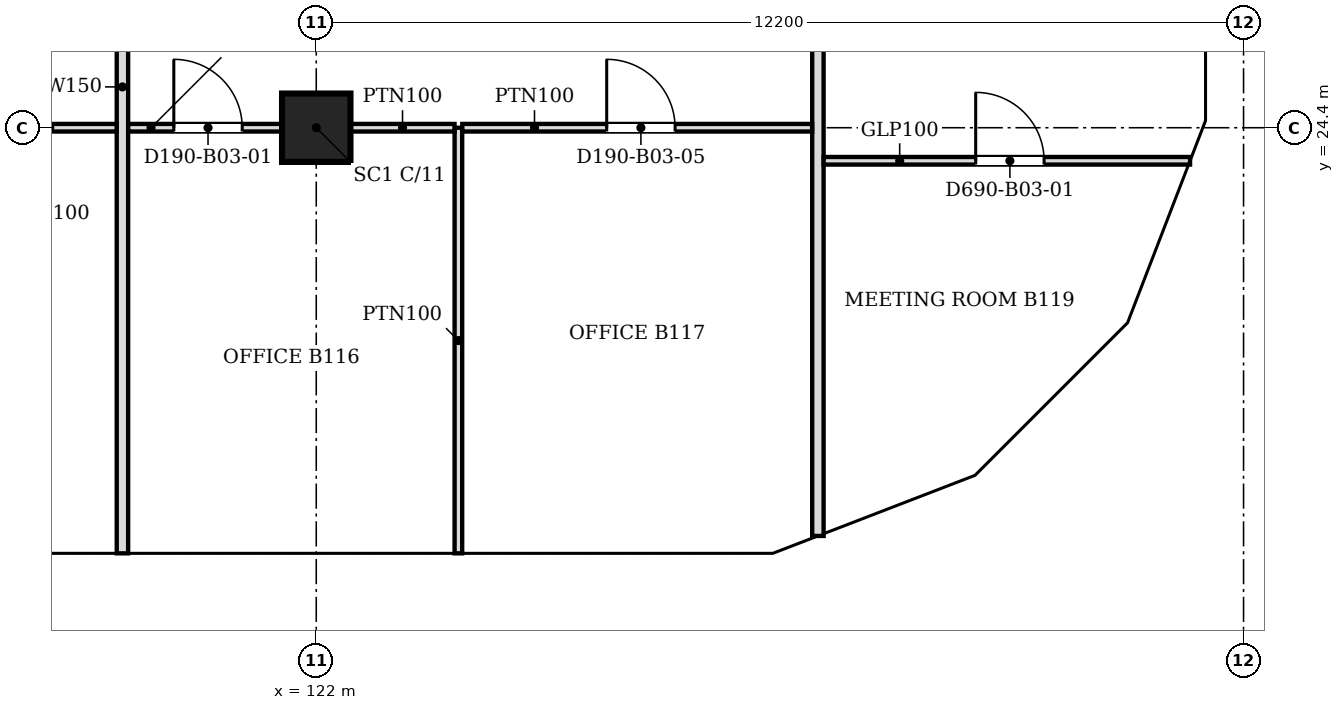
"""IFC4 building model, lengths in metres.
Left out: names, types, materials, properties, quantities, classifications, styles, units other than length and angle.
Written with IfcOpenShell. Run it as: python <this file> out.ifc"""

import sys

from ifc_helpers import new_model, si_unit, direction, frame, frame_2d, origin, origin_2d, place, context, subcontext, project, spatial, polyline, rectangle, outline, extrude, faceted_brep, source, transform, mapped, element, fill, save


model = new_model("IFC4")
c1 = context("Model", 3, precision=1e-05, world=origin(), true_north=direction((0.0, 1.0)))
c2 = subcontext(c1, "Body", "Model", "MODEL_VIEW")
j1 = project(units=[si_unit("LENGTHUNIT", "METRE"), si_unit("PLANEANGLEUNIT", "RADIAN")], contexts=[c1])
p1 = place(None, origin())
s1 = spatial("IfcSite", under=j1, at=p1, CompositionType="ELEMENT")
p2 = place(p1, origin())
s2 = spatial("IfcBuilding", under=s1, at=p2, CompositionType="ELEMENT")
p3 = place(p2, frame((0.0, 0.0, 33.4)))
s3 = spatial("IfcBuildingStorey", under=s2, at=p3, CompositionType="ELEMENT", Elevation=33.4)
p4 = place(p3, frame((122.0, 24.4, 0.0), z_axis=(0.0, 0.0, 1.0), x_axis=(1.0, 0.0, 0.0)))
e1 = element("IfcColumn", 1, at=p4, inside=s3, PredefinedType="COLUMN", context=c2, shape_type="SweptSolid", body=[
    extrude(rectangle(XDim=0.9, YDim=0.9, at=origin_2d()), origin(), (0.0, 0.0, 1.0), 3.6),
])
m1 = source(origin(), c2, "Body", "Brep", [
    faceted_brep([(3.05, -0.25, 0.0), (6.1, -0.25, 3.8), (6.1, -0.25, 3.8), (3.05, -0.25, 7.6), (0.0, -0.25, 3.8), (0.0, 0.25, 3.8), (3.05, 0.25, 7.6), (6.1, 0.25, 3.8), (6.1, 0.25, 3.8), (3.05, 0.25, 0.0)], [[[0, 1, 2, 3, 4]], [[5, 6, 7, 8, 9]], [[9, 8, 1, 0]], [[7, 6, 3, 2]], [[6, 5, 4, 3]], [[5, 9, 0, 4]], [[1, 8, 7, 2]]]),
])
p5 = place(p3, frame((112.85, 18.55, -3.8), z_axis=(0.0, 0.0, 1.0), x_axis=(1.0, 0.0, 0.0)))
e2 = element("IfcWall", 2, at=p5, inside=s3, PredefinedType="SOLIDWALL", context=c2, shape_type="MappedRepresentation", body=[
    mapped(m1, transform((0.0, 0.0, 0.0), scale=1.0)),
])
m2 = source(origin(), c2, "Body", "SweptSolid", [
    extrude(outline(polyline([(3.05, 0.399), (5.78, 3.8), (3.05, 7.2), (0.321, 3.8), (3.05, 0.399)])), frame((0.0, 0.26, 0.0), z_axis=(0.0, -1.0, 0.0), x_axis=(1.0, 0.0, 0.0)), (0.0, 0.0, 1.0), 0.52),
])
p6 = place(p5, origin())
e3 = element("IfcOpeningElement", 3, at=p6, cuts=e2, PredefinedType="OPENING", context=c2, shape_type="MappedRepresentation", body=[
    mapped(m2, transform((0.0, 0.0, 0.0), scale=1.0)),
])
m3 = source(origin(), c2, "Body", "SweptSolid", [
    extrude(outline(polyline([(3.05, 0.0), (6.1, 3.8), (3.05, 7.6), (0.0, 3.8), (3.05, 0.0)])), frame((0.0, 0.25, 0.0), z_axis=(0.0, -1.0, 0.0), x_axis=(1.0, 0.0, 0.0)), (0.0, 0.0, 1.0), 0.5),
])
p7 = place(p3, frame((118.95, 18.55, -3.8), z_axis=(0.0, 0.0, 1.0), x_axis=(1.0, 0.0, 0.0)))
e4 = element("IfcWall", 4, at=p7, inside=s3, PredefinedType="SOLIDWALL", context=c2, shape_type="MappedRepresentation", body=[
    mapped(m3, transform((0.0, 0.0, 0.0), scale=1.0)),
])
p8 = place(p7, origin())
e5 = element("IfcOpeningElement", 5, at=p8, cuts=e4, PredefinedType="OPENING", context=c2, shape_type="MappedRepresentation", body=[
    mapped(m2, transform((0.0, 0.0, 0.0), scale=1.0)),
])
m4 = source(origin(), c2, "Body", "Brep", [
    faceted_brep([(3.003, -0.25, 0.0), (3.05, -0.25, 0.06), (3.05, -0.25, 7.54), (3.003, -0.25, 7.6), (0.0, -0.25, 3.8), (0.0, 0.25, 3.8), (2.957, 0.25, 7.541), (2.957, 0.25, 0.059), (3.003, 0.0, 0.0), (3.003, 0.0, 7.6)], [[[0, 1, 2, 3, 4]], [[5, 6, 7]], [[1, 0, 8]], [[9, 3, 2]], [[6, 5, 4, 3, 9]], [[5, 7, 8, 0, 4]], [[1, 8, 7, 6, 9, 2]]]),
])
p9 = place(p3, frame((125.05, 18.55, -3.8), z_axis=(0.0, 0.0, 1.0), x_axis=(1.0, 0.0, 0.0)))
e6 = element("IfcWall", 6, at=p9, inside=s3, PredefinedType="SOLIDWALL", context=c2, shape_type="MappedRepresentation", body=[
    mapped(m4, transform((0.0, 0.0, 0.0), scale=1.0)),
])
m5 = source(origin(), c2, "Body", "SweptSolid", [
    extrude(outline(polyline([(2.803, 6.944), (0.319, 3.8), (2.803, 0.656), (2.803, 6.944)])), frame((0.0, 0.26, 0.0), z_axis=(0.0, -1.0, 0.0), x_axis=(1.0, 0.0, 0.0)), (0.0, 0.0, 1.0), 0.52),
])
p10 = place(p9, origin())
e7 = element("IfcOpeningElement", 7, at=p10, cuts=e6, PredefinedType="OPENING", context=c2, shape_type="MappedRepresentation", body=[
    mapped(m5, transform((0.0, 0.0, 0.0), scale=1.0)),
])
m6 = source(origin(), c2, "Body", "Brep", [
    faceted_brep([(0.047, -0.25, 0.0), (2.997, -0.25, 3.8), (0.047, -0.25, 7.6), (0.0, -0.25, 7.541), (0.0, -0.25, 0.059), (0.093, 0.25, 7.54), (2.944, 0.25, 3.868), (2.944, 0.25, 3.732), (0.093, 0.25, 0.06), (2.997, 0.0, 3.8), (0.047, 0.0, 0.0), (0.047, 0.0, 7.6)], [[[0, 1, 2, 3, 4]], [[5, 6, 7, 8]], [[8, 7, 9, 1, 0, 10]], [[6, 5, 11, 2, 1, 9]], [[3, 2, 11]], [[10, 0, 4]], [[8, 10, 4, 3, 11, 5]], [[9, 7, 6]]]),
])
p11 = place(p3, frame((128.01, 18.533, -3.8), z_axis=(0.0, 0.0, 1.0), x_axis=(0.932990326376, 0.359901446078, 0.0)))
e8 = element("IfcWall", 8, at=p11, inside=s3, PredefinedType="SOLIDWALL", context=c2, shape_type="MappedRepresentation", body=[
    mapped(m6, transform((0.0, 0.0, 0.0), scale=1.0)),
])
m7 = source(origin(), c2, "Body", "SweptSolid", [
    extrude(outline(polyline([(0.247, 0.665), (2.681, 3.8), (0.247, 6.935), (0.247, 0.665)])), frame((0.0, 0.26, 0.0), z_axis=(0.0, -1.0, 0.0), x_axis=(1.0, 0.0, 0.0)), (0.0, 0.0, 1.0), 0.52),
])
p12 = place(p11, origin())
e9 = element("IfcOpeningElement", 9, at=p12, cuts=e8, PredefinedType="OPENING", context=c2, shape_type="MappedRepresentation", body=[
    mapped(m7, transform((0.0, 0.0, 0.0), scale=1.0)),
])
m8 = source(origin(), c2, "Body", "Brep", [
    faceted_brep([(2.944, -0.25, 0.0), (2.997, -0.25, 0.068), (2.997, -0.25, 7.532), (2.944, -0.25, 7.6), (0.0, -0.25, 3.8), (0.053, 0.25, 3.868), (2.891, 0.25, 7.532), (2.891, 0.25, 0.068), (0.053, 0.25, 3.731), (2.944, 0.0, 0.0), (2.944, 0.0, 7.6), (0.0, 0.0, 3.8)], [[[0, 1, 2, 3, 4]], [[5, 6, 7, 8]], [[1, 0, 9]], [[10, 3, 2]], [[6, 5, 11, 4, 3, 10]], [[8, 7, 9, 0, 4, 11]], [[8, 11, 5]], [[1, 9, 7, 6, 10, 2]]]),
])
p13 = place(p3, frame((130.806, 19.612, -3.8), z_axis=(0.0, 0.0, 1.0), x_axis=(0.707106781187, 0.707106781187, 0.0)))
e10 = element("IfcWall", 10, at=p13, inside=s3, PredefinedType="SOLIDWALL", context=c2, shape_type="MappedRepresentation", body=[
    mapped(m8, transform((0.0, 0.0, 0.0), scale=1.0)),
])
m9 = source(origin(), c2, "Body", "SweptSolid", [
    extrude(outline(polyline([(2.744, 6.934), (0.316, 3.8), (2.744, 0.666), (2.744, 6.934)])), frame((0.0, 0.26, 0.0), z_axis=(0.0, -1.0, 0.0), x_axis=(1.0, 0.0, 0.0)), (0.0, 0.0, 1.0), 0.52),
])
p14 = place(p13, origin())
e11 = element("IfcOpeningElement", 11, at=p14, cuts=e10, PredefinedType="OPENING", context=c2, shape_type="MappedRepresentation", body=[
    mapped(m9, transform((0.0, 0.0, 0.0), scale=1.0)),
])
m10 = source(origin(), c2, "Body", "Brep", [
    faceted_brep([(0.053, -0.25, 0.0), (3.003, -0.25, 3.8), (0.053, -0.25, 7.6), (0.0, -0.25, 7.531), (0.0, -0.25, 0.068), (0.106, 0.25, 7.532), (2.957, 0.25, 3.86), (2.957, 0.25, 3.74), (0.106, 0.25, 0.068), (3.003, 0.0, 3.8), (0.053, 0.0, 0.0), (0.053, 0.0, 7.6)], [[[0, 1, 2, 3, 4]], [[5, 6, 7, 8]], [[8, 7, 9, 1, 0, 10]], [[6, 5, 11, 2, 1, 9]], [[3, 2, 11]], [[10, 0, 4]], [[8, 10, 4, 3, 11, 5]], [[9, 7, 6]]]),
])
p15 = place(p3, frame((132.869, 21.644, -3.8), z_axis=(0.0, 0.0, 1.0), x_axis=(0.359855894603, 0.933007896601, 0.0)))
e12 = element("IfcWall", 12, at=p15, inside=s3, PredefinedType="SOLIDWALL", context=c2, shape_type="MappedRepresentation", body=[
    mapped(m10, transform((0.0, 0.0, 0.0), scale=1.0)),
])
m11 = source(origin(), c2, "Body", "SweptSolid", [
    extrude(outline(polyline([(0.253, 0.665), (2.687, 3.8), (0.253, 6.935), (0.253, 0.665)])), frame((0.0, 0.26, 0.0), z_axis=(0.0, -1.0, 0.0), x_axis=(1.0, 0.0, 0.0)), (0.0, 0.0, 1.0), 0.52),
])
p16 = place(p15, origin())
e13 = element("IfcOpeningElement", 13, at=p16, cuts=e12, PredefinedType="OPENING", context=c2, shape_type="MappedRepresentation", body=[
    mapped(m11, transform((0.0, 0.0, 0.0), scale=1.0)),
])
m12 = source(origin(), c2, "Body", "Brep", [
    faceted_brep([(3.003, -0.25, 0.0), (6.053, -0.25, 3.8), (3.003, -0.25, 7.6), (0.0, -0.25, 3.8), (0.047, 0.25, 3.859), (3.003, 0.25, 7.6), (6.053, 0.25, 3.8), (3.003, 0.25, 0.0), (0.047, 0.25, 3.741), (0.0, 0.0, 3.8)], [[[0, 1, 2, 3]], [[4, 5, 6, 7, 8]], [[7, 6, 1, 0]], [[6, 5, 2, 1]], [[5, 4, 9, 3, 2]], [[8, 7, 0, 3, 9]], [[8, 9, 4]]]),
])
p17 = place(p3, frame((133.95, 24.447, -3.8), z_axis=(0.0, 0.0, 1.0), x_axis=(0.0, 1.0, 0.0)))
e14 = element("IfcWall", 14, at=p17, inside=s3, PredefinedType="SOLIDWALL", context=c2, shape_type="MappedRepresentation", body=[
    mapped(m12, transform((0.0, 0.0, 0.0), scale=1.0)),
])
m13 = source(origin(), c2, "Body", "SweptSolid", [
    extrude(outline(polyline([(3.005, 0.401), (5.733, 3.8), (3.005, 7.199), (0.319, 3.8), (3.005, 0.401)])), frame((0.0, 0.26, 0.0), z_axis=(0.0, -1.0, 0.0), x_axis=(1.0, 0.0, 0.0)), (0.0, 0.0, 1.0), 0.52),
])
p18 = place(p17, origin())
e15 = element("IfcOpeningElement", 15, at=p18, cuts=e14, PredefinedType="OPENING", context=c2, shape_type="MappedRepresentation", body=[
    mapped(m13, transform((0.0, 0.0, 0.0), scale=1.0)),
])
p19 = place(p2, frame((0.0, 0.0, 37.2)))
s4 = spatial("IfcBuildingStorey", under=s2, at=p19, CompositionType="ELEMENT", Elevation=37.2)
m14 = source(origin(), c2, "Body", "SweptSolid", [
    extrude(outline(polyline([(3.05, 0.0), (6.1, 3.8), (3.05, 7.6), (0.0, 3.8), (3.05, 0.0)])), frame((0.0, 0.25, 0.0), z_axis=(0.0, -1.0, 0.0), x_axis=(1.0, 0.0, 0.0)), (0.0, 0.0, 1.0), 0.5),
])
p20 = place(p19, frame((115.9, 18.55, -3.8), z_axis=(0.0, 0.0, 1.0), x_axis=(1.0, 0.0, 0.0)))
e16 = element("IfcWall", 16, at=p20, inside=s4, PredefinedType="SOLIDWALL", context=c2, shape_type="MappedRepresentation", body=[
    mapped(m14, transform((0.0, 0.0, 0.0), scale=1.0)),
])
m15 = source(origin(), c2, "Body", "SweptSolid", [
    extrude(outline(polyline([(3.05, 0.399), (5.78, 3.8), (3.05, 7.201), (0.321, 3.8), (3.05, 0.399)])), frame((0.0, 0.26, 0.0), z_axis=(0.0, -1.0, 0.0), x_axis=(1.0, 0.0, 0.0)), (0.0, 0.0, 1.0), 0.52),
])
p21 = place(p20, origin())
e17 = element("IfcOpeningElement", 17, at=p21, cuts=e16, PredefinedType="OPENING", context=c2, shape_type="MappedRepresentation", body=[
    mapped(m15, transform((0.0, 0.0, 0.0), scale=1.0)),
])
m16 = source(origin(), c2, "Body", "Brep", [
    faceted_brep([(3.05, -0.25, 0.0), (6.053, -0.25, 3.8), (3.05, -0.25, 7.6), (0.0, -0.25, 3.8), (0.0, 0.25, 3.8), (3.05, 0.25, 7.6), (6.007, 0.25, 3.859), (6.007, 0.25, 3.741), (3.05, 0.25, 0.0), (6.053, 0.0, 3.8)], [[[0, 1, 2, 3]], [[4, 5, 6, 7, 8]], [[8, 7, 9, 1, 0]], [[6, 5, 2, 1, 9]], [[5, 4, 3, 2]], [[4, 8, 0, 3]], [[9, 7, 6]]]),
])
p22 = place(p19, frame((122.0, 18.55, -3.8), z_axis=(0.0, 0.0, 1.0), x_axis=(1.0, 0.0, 0.0)))
e18 = element("IfcWall", 18, at=p22, inside=s4, PredefinedType="SOLIDWALL", context=c2, shape_type="MappedRepresentation", body=[
    mapped(m16, transform((0.0, 0.0, 0.0), scale=1.0)),
])
m17 = source(origin(), c2, "Body", "SweptSolid", [
    extrude(outline(polyline([(3.049, 0.401), (5.735, 3.8), (3.049, 7.199), (0.321, 3.8), (3.049, 0.401)])), frame((0.0, 0.26, 0.0), z_axis=(0.0, -1.0, 0.0), x_axis=(1.0, 0.0, 0.0)), (0.0, 0.0, 1.0), 0.52),
])
p23 = place(p22, origin())
e19 = element("IfcOpeningElement", 19, at=p23, cuts=e18, PredefinedType="OPENING", context=c2, shape_type="MappedRepresentation", body=[
    mapped(m17, transform((0.0, 0.0, 0.0), scale=1.0)),
])
m18 = source(origin(), c2, "Body", "Brep", [
    faceted_brep([(2.95, -0.25, 0.0), (3.003, -0.25, 0.068), (3.003, -0.25, 7.532), (2.95, -0.25, 7.6), (0.0, -0.25, 3.8), (0.047, 0.25, 3.86), (2.898, 0.25, 7.532), (2.898, 0.25, 0.068), (0.047, 0.25, 3.74), (2.95, 0.0, 0.0), (2.95, 0.0, 7.6), (0.0, 0.0, 3.8)], [[[0, 1, 2, 3, 4]], [[5, 6, 7, 8]], [[1, 0, 9]], [[10, 3, 2]], [[6, 5, 11, 4, 3, 10]], [[8, 7, 9, 0, 4, 11]], [[8, 11, 5]], [[1, 9, 7, 6, 10, 2]]]),
])
p24 = place(p19, frame((128.053, 18.55, -3.8), z_axis=(0.0, 0.0, 1.0), x_axis=(0.933007896601, 0.359855894603, 0.0)))
e20 = element("IfcWall", 20, at=p24, inside=s4, PredefinedType="SOLIDWALL", context=c2, shape_type="MappedRepresentation", body=[
    mapped(m18, transform((0.0, 0.0, 0.0), scale=1.0)),
])
m19 = source(origin(), c2, "Body", "SweptSolid", [
    extrude(outline(polyline([(2.75, 6.935), (0.316, 3.8), (2.75, 0.665), (2.75, 6.935)])), frame((0.0, 0.26, 0.0), z_axis=(0.0, -1.0, 0.0), x_axis=(1.0, 0.0, 0.0)), (0.0, 0.0, 1.0), 0.52),
])
p25 = place(p24, origin())
e21 = element("IfcOpeningElement", 21, at=p25, cuts=e20, PredefinedType="OPENING", context=c2, shape_type="MappedRepresentation", body=[
    mapped(m19, transform((0.0, 0.0, 0.0), scale=1.0)),
])
m20 = source(origin(), c2, "Body", "Brep", [
    faceted_brep([(0.053, -0.25, 0.0), (2.997, -0.25, 3.8), (0.053, -0.25, 7.6), (0.0, -0.25, 7.532), (0.0, -0.25, 0.068), (0.106, 0.25, 7.532), (2.944, 0.25, 3.868), (2.944, 0.25, 3.732), (0.106, 0.25, 0.068), (2.997, 0.0, 3.8), (0.053, 0.0, 0.0), (0.053, 0.0, 7.6)], [[[0, 1, 2, 3, 4]], [[5, 6, 7, 8]], [[8, 7, 9, 1, 0, 10]], [[6, 5, 11, 2, 1, 9]], [[3, 2, 11]], [[10, 0, 4]], [[8, 10, 4, 3, 11, 5]], [[9, 7, 6]]]),
])
p26 = place(p19, frame((130.769, 19.574, -3.8), z_axis=(0.0, 0.0, 1.0), x_axis=(0.707106781187, 0.707106781187, 0.0)))
e22 = element("IfcWall", 22, at=p26, inside=s4, PredefinedType="SOLIDWALL", context=c2, shape_type="MappedRepresentation", body=[
    mapped(m20, transform((0.0, 0.0, 0.0), scale=1.0)),
])
m21 = source(origin(), c2, "Body", "SweptSolid", [
    extrude(outline(polyline([(0.253, 0.667), (2.681, 3.8), (0.253, 6.934), (0.253, 0.667)])), frame((0.0, 0.26, 0.0), z_axis=(0.0, -1.0, 0.0), x_axis=(1.0, 0.0, 0.0)), (0.0, 0.0, 1.0), 0.52),
])
p27 = place(p26, origin())
e23 = element("IfcOpeningElement", 23, at=p27, cuts=e22, PredefinedType="OPENING", context=c2, shape_type="MappedRepresentation", body=[
    mapped(m21, transform((0.0, 0.0, 0.0), scale=1.0)),
])
m22 = source(origin(), c2, "Body", "Brep", [
    faceted_brep([(2.95, -0.25, 0.0), (2.997, -0.25, 0.059), (2.997, -0.25, 7.541), (2.95, -0.25, 7.6), (0.0, -0.25, 3.8), (0.053, 0.25, 3.868), (2.904, 0.25, 7.54), (2.904, 0.25, 0.06), (0.053, 0.25, 3.732), (2.95, 0.0, 0.0), (2.95, 0.0, 7.6), (0.0, 0.0, 3.8)], [[[0, 1, 2, 3, 4]], [[5, 6, 7, 8]], [[1, 0, 9]], [[10, 3, 2]], [[6, 5, 11, 4, 3, 10]], [[8, 7, 9, 0, 4, 11]], [[8, 11, 5]], [[1, 9, 7, 6, 10, 2]]]),
])
p28 = place(p19, frame((132.888, 21.694, -3.8), z_axis=(0.0, 0.0, 1.0), x_axis=(0.359901446078, 0.932990326376, 0.0)))
e24 = element("IfcWall", 24, at=p28, inside=s4, PredefinedType="SOLIDWALL", context=c2, shape_type="MappedRepresentation", body=[
    mapped(m22, transform((0.0, 0.0, 0.0), scale=1.0)),
])
p29 = place(p28, origin())
e25 = element("IfcOpeningElement", 25, at=p29, cuts=e24, PredefinedType="OPENING", context=c2, shape_type="MappedRepresentation", body=[
    mapped(m19, transform((0.0, 0.0, 0.0), scale=1.0)),
])
m23 = source(origin(), c2, "Body", "Brep", [
    faceted_brep([(0.047, -0.25, 0.0), (3.05, -0.25, 3.8), (0.047, -0.25, 7.6), (0.0, -0.25, 7.54), (0.0, -0.25, 0.06), (0.093, 0.25, 7.541), (3.05, 0.25, 3.8), (0.093, 0.25, 0.059), (0.047, 0.0, 0.0), (0.047, 0.0, 7.6)], [[[0, 1, 2, 3, 4]], [[5, 6, 7]], [[7, 6, 1, 0, 8]], [[6, 5, 9, 2, 1]], [[3, 2, 9]], [[8, 0, 4]], [[7, 8, 4, 3, 9, 5]]]),
])
p30 = place(p19, frame((133.95, 24.4, -3.8), z_axis=(0.0, 0.0, 1.0), x_axis=(0.0, 1.0, 0.0)))
e26 = element("IfcWall", 26, at=p30, inside=s4, PredefinedType="SOLIDWALL", context=c2, shape_type="MappedRepresentation", body=[
    mapped(m23, transform((0.0, 0.0, 0.0), scale=1.0)),
])
m24 = source(origin(), c2, "Body", "SweptSolid", [
    extrude(outline(polyline([(0.247, 0.656), (2.731, 3.8), (0.247, 6.944), (0.247, 0.656)])), frame((0.0, 0.26, 0.0), z_axis=(0.0, -1.0, 0.0), x_axis=(1.0, 0.0, 0.0)), (0.0, 0.0, 1.0), 0.52),
])
p31 = place(p30, origin())
e27 = element("IfcOpeningElement", 27, at=p31, cuts=e26, PredefinedType="OPENING", context=c2, shape_type="MappedRepresentation", body=[
    mapped(m24, transform((0.0, 0.0, 0.0), scale=1.0)),
])
p32 = place(p3, frame((119.45, 18.8, 0.0), z_axis=(0.0, 0.0, 1.0), x_axis=(0.0, 1.0, 0.0)))
e28 = element("IfcWall", 28, at=p32, inside=s3, PredefinedType="PARTITIONING", context=c2, shape_type="SweptSolid", body=[
    extrude(rectangle(XDim=12.274, YDim=0.15, at=frame_2d((6.137, 0.0))), origin(), (0.0, 0.0, 1.0), 3.067),
])
p33 = place(p3, frame((123.87, 18.8, 0.0), z_axis=(0.0, 0.0, 1.0), x_axis=(0.0, 1.0, 0.0)))
e29 = element("IfcWall", 29, at=p33, inside=s3, PredefinedType="PARTITIONING", context=c2, shape_type="SweptSolid", body=[
    extrude(rectangle(XDim=5.6, YDim=0.1, at=frame_2d((2.8, 0.0))), origin(), (0.0, 0.0, 1.0), 3.067),
])
p34 = place(p3, frame((128.6, 19.029, 0.0), z_axis=(0.0, 0.0, 1.0), x_axis=(0.0, 1.0, 0.0)))
e30 = element("IfcWall", 30, at=p34, inside=s3, PredefinedType="PARTITIONING", context=c2, shape_type="SweptSolid", body=[
    extrude(rectangle(XDim=15.095, YDim=0.15, at=frame_2d((7.548, 0.0))), origin(), (0.0, 0.0, 1.0), 3.067),
])
p35 = place(p3, frame((133.496, 23.965, 0.0), z_axis=(0.0, 0.0, 1.0), x_axis=(-1.0, 0.0, 0.0)))
e31 = element("IfcWall", 31, at=p35, inside=s3, PredefinedType="PARTITIONING", context=c2, shape_type="SweptSolid", body=[
    extrude(rectangle(XDim=4.82, YDim=0.1, at=frame_2d((2.41, 0.0))), origin(), (0.0, 0.0, 1.0), 3.067),
])
m25 = source(origin(), c2, "Body", "SweptSolid", [
    extrude(rectangle(XDim=0.9, YDim=2.1, at=frame_2d((0.45, 1.05))), frame((0.0, 0.06, 0.0), z_axis=(0.0, -1.0, 0.0), x_axis=(1.0, 0.0, 0.0)), (0.0, 0.0, 1.0), 0.12),
])
p36 = place(p35, frame((1.92, 0.0, 0.0)))
e32 = element("IfcOpeningElement", 32, at=p36, cuts=e31, PredefinedType="OPENING", context=c2, shape_type="MappedRepresentation", body=[
    mapped(m25, transform((0.0, 0.0, 0.0), scale=1.0)),
])
p37 = place(p3, frame((119.374, 24.4, 0.0), z_axis=(0.0, 0.0, 1.0), x_axis=(-1.0, 0.0, 0.0)))
e33 = element("IfcWall", 33, at=p37, inside=s3, PredefinedType="PARTITIONING", context=c2, shape_type="SweptSolid", body=[
    extrude(rectangle(XDim=4.36, YDim=0.1, at=frame_2d((2.18, 0.0))), origin(), (0.0, 0.0, 1.0), 3.067),
])
p38 = place(p37, frame((1.76, 0.0, 0.0)))
e34 = element("IfcOpeningElement", 34, at=p38, cuts=e33, PredefinedType="OPENING", context=c2, shape_type="MappedRepresentation", body=[
    mapped(m25, transform((0.0, 0.0, 0.0), scale=1.0)),
])
p39 = place(p3, frame((121.549, 24.4, 0.0), z_axis=(0.0, 0.0, 1.0), x_axis=(-1.0, 0.0, 0.0)))
e35 = element("IfcWall", 35, at=p39, inside=s3, PredefinedType="PARTITIONING", context=c2, shape_type="SweptSolid", body=[
    extrude(rectangle(XDim=2.023, YDim=0.1, at=frame_2d((1.012, 0.0))), origin(), (0.0, 0.0, 1.0), 3.067),
])
p40 = place(p39, frame((0.523, 0.0, 0.0)))
e36 = element("IfcOpeningElement", 36, at=p40, cuts=e35, PredefinedType="OPENING", context=c2, shape_type="MappedRepresentation", body=[
    mapped(m25, transform((0.0, 0.0, 0.0), scale=1.0)),
])
p41 = place(p3, frame((122.451, 24.4, 0.0), z_axis=(0.0, 0.0, 1.0), x_axis=(1.0, 0.0, 0.0)))
e37 = element("IfcWall", 37, at=p41, inside=s3, PredefinedType="PARTITIONING", context=c2, shape_type="SweptSolid", body=[
    extrude(rectangle(XDim=1.368, YDim=0.1, at=frame_2d((0.684, 0.0))), origin(), (0.0, 0.0, 1.0), 3.067),
])
p42 = place(p3, frame((128.524, 24.4, 0.0), z_axis=(0.0, 0.0, 1.0), x_axis=(-1.0, 0.0, 0.0)))
e38 = element("IfcWall", 38, at=p42, inside=s3, PredefinedType="PARTITIONING", context=c2, shape_type="SweptSolid", body=[
    extrude(rectangle(XDim=4.603, YDim=0.1, at=frame_2d((2.301, 0.0))), origin(), (0.0, 0.0, 1.0), 3.067),
])
p43 = place(p42, frame((1.803, 0.0, 0.0)))
e39 = element("IfcOpeningElement", 39, at=p43, cuts=e38, PredefinedType="OPENING", context=c2, shape_type="MappedRepresentation", body=[
    mapped(m25, transform((0.0, 0.0, 0.0), scale=1.0)),
])
m26 = source(origin(), c2, "Body", "SweptSolid", [
    extrude(rectangle(XDim=0.9, YDim=2.1, at=frame_2d((0.45, 1.05))), frame((0.0, 0.025, 0.0), z_axis=(0.0, -1.0, 0.0), x_axis=(1.0, 0.0, 0.0)), (0.0, 0.0, 1.0), 0.05),
])
p44 = place(p40, origin())
e40 = element("IfcDoor", 40, at=p44, inside=s3, OperationType="SINGLE_SWING_RIGHT", PredefinedType="DOOR", context=c2, shape_type="MappedRepresentation", body=[
    mapped(m26, transform((0.0, 0.0, 0.0), scale=1.0)),
])
fill(e36, e40)
p45 = place(p43, origin())
e41 = element("IfcDoor", 41, at=p45, inside=s3, OperationType="SINGLE_SWING_RIGHT", PredefinedType="DOOR", context=c2, shape_type="MappedRepresentation", body=[
    mapped(m26, transform((0.0, 0.0, 0.0), scale=1.0)),
])
fill(e39, e41)
p46 = place(p36, origin())
e42 = element("IfcDoor", 42, at=p46, inside=s3, OperationType="SINGLE_SWING_RIGHT", PredefinedType="DOOR", context=c2, shape_type="MappedRepresentation", body=[
    mapped(m26, transform((0.0, 0.0, 0.0), scale=1.0)),
])
fill(e32, e42)
save(model, sys.argv[1])
